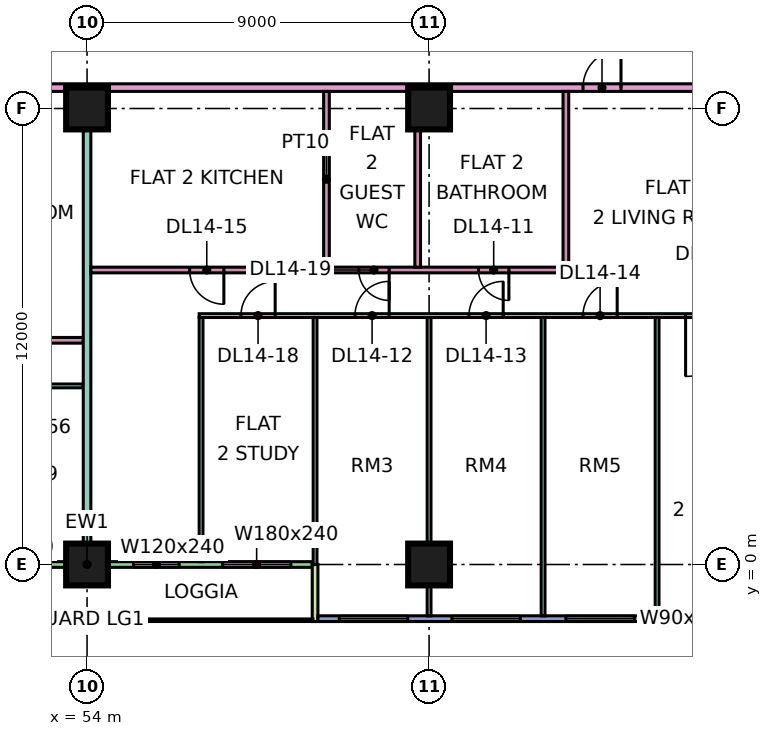
"""IFC4 building model, lengths in metres.
Left out: names, types, materials, properties, quantities, classifications, styles, units other than length and angle.
Written with IfcOpenShell. Run it as: python <this file> out.ifc"""

import sys

from ifc_helpers import new_model, si_unit, direction, frame, frame_2d, origin, origin_2d, place, context, subcontext, project, spatial, rectangle, extrude, element, fill, save


model = new_model("IFC4")
c1 = context("Model", 3, precision=1e-05, world=origin(), true_north=direction((0.0, 1.0)))
c2 = subcontext(c1, "Body", "Model", "MODEL_VIEW")
j1 = project(units=[si_unit("LENGTHUNIT", "METRE"), si_unit("PLANEANGLEUNIT", "RADIAN")], contexts=[c1])
p1 = place(None, origin())
s1 = spatial("IfcSite", under=j1, at=p1, CompositionType="ELEMENT")
p2 = place(p1, origin())
s2 = spatial("IfcBuilding", under=s1, at=p2, CompositionType="ELEMENT")
p3 = place(p2, frame((0.0, 0.0, 67.65)))
s3 = spatial("IfcBuildingStorey", under=s2, at=p3, CompositionType="ELEMENT", Elevation=67.65)
for number, where, z_axis, x_axis in (
    (1, (54.0, 0.0, 0.0), (0.0, 0.0, 1.0), (1.0, 0.0, 0.0)),
    (2, (54.0, 12.0, 0.0), (0.0, 0.0, 1.0), (1.0, 0.0, 0.0)),
    (3, (63.0, 0.0, 0.0), (0.0, 0.0, 1.0), (1.0, 0.0, 0.0)),
    (4, (63.0, 12.0, 0.0), (0.0, 0.0, 1.0), (1.0, 0.0, 0.0)),
):
    element("IfcColumn", number, at=place(p3, frame(where, z_axis=z_axis, x_axis=x_axis)), inside=s3, PredefinedType="COLUMN", context=c2, shape_type="SweptSolid", body=[
        extrude(rectangle(XDim=1.1, YDim=1.1, at=origin_2d()), origin(), (0.0, 0.0, 1.0), 3.75),
    ])
p4 = place(p3, frame((48.075, 0.0, 0.0), z_axis=(0.0, 0.0, 1.0), x_axis=(1.0, 0.0, 0.0)))
e5 = element("IfcWall", 5, at=p4, inside=s3, PredefinedType="SOLIDWALL", context=c2, shape_type="SweptSolid", body=[
    extrude(rectangle(XDim=11.85, YDim=0.15, at=frame_2d((5.925, 0.0))), origin(), (0.0, 0.0, 1.0), 3.35),
])
p5 = place(p4, frame((0.562, 0.0, 0.45)))
e6 = element("IfcOpeningElement", 6, at=p5, cuts=e5, PredefinedType="OPENING", context=c2, shape_type="SweptSolid", body=[
    extrude(rectangle(XDim=1.8, YDim=2.4, at=frame_2d((0.9, 1.2))), frame((0.0, 0.085, 0.0), z_axis=(0.0, -1.0, 0.0), x_axis=(1.0, 0.0, 0.0)), (0.0, 0.0, 1.0), 0.17),
])
p6 = place(p4, frame((3.5, 0.0, 0.45)))
e7 = element("IfcOpeningElement", 7, at=p6, cuts=e5, PredefinedType="OPENING", context=c2, shape_type="SweptSolid", body=[
    extrude(rectangle(XDim=1.2, YDim=2.4, at=frame_2d((0.6, 1.2))), frame((0.0, 0.085, 0.0), z_axis=(0.0, -1.0, 0.0), x_axis=(1.0, 0.0, 0.0)), (0.0, 0.0, 1.0), 0.17),
])
p7 = place(p4, frame((7.15, 0.0, 0.45)))
e8 = element("IfcOpeningElement", 8, at=p7, cuts=e5, PredefinedType="OPENING", context=c2, shape_type="SweptSolid", body=[
    extrude(rectangle(XDim=1.2, YDim=2.4, at=frame_2d((0.6, 1.2))), frame((0.0, 0.085, 0.0), z_axis=(0.0, -1.0, 0.0), x_axis=(1.0, 0.0, 0.0)), (0.0, 0.0, 1.0), 0.17),
])
p8 = place(p4, frame((9.488, 0.0, 0.45)))
e9 = element("IfcOpeningElement", 9, at=p8, cuts=e5, PredefinedType="OPENING", context=c2, shape_type="SweptSolid", body=[
    extrude(rectangle(XDim=1.8, YDim=2.4, at=frame_2d((0.9, 1.2))), frame((0.0, 0.085, 0.0), z_axis=(0.0, -1.0, 0.0), x_axis=(1.0, 0.0, 0.0)), (0.0, 0.0, 1.0), 0.17),
])
p9 = place(p3, frame((60.0, -1.5, 0.0), z_axis=(0.0, 0.0, 1.0), x_axis=(0.0, 1.0, 0.0)))
e10 = element("IfcWall", 10, at=p9, inside=s3, PredefinedType="SOLIDWALL", context=c2, shape_type="SweptSolid", body=[
    extrude(rectangle(XDim=1.5, YDim=0.15, at=frame_2d((0.75, 0.0))), origin(), (0.0, 0.0, 1.0), 3.35),
])
p10 = place(p3, frame((60.075, -1.425, 0.0), z_axis=(0.0, 0.0, 1.0), x_axis=(1.0, 0.0, 0.0)))
e11 = element("IfcWall", 11, at=p10, inside=s3, PredefinedType="SOLIDWALL", context=c2, shape_type="SweptSolid", body=[
    extrude(rectangle(XDim=10.425, YDim=0.15, at=frame_2d((5.212, 0.0))), origin(), (0.0, 0.0, 1.0), 3.35),
])
p11 = place(p10, frame((0.562, 0.0, 0.45)))
e12 = element("IfcOpeningElement", 12, at=p11, cuts=e11, PredefinedType="OPENING", context=c2, shape_type="SweptSolid", body=[
    extrude(rectangle(XDim=1.8, YDim=2.4, at=frame_2d((0.9, 1.2))), frame((0.0, 0.085, 0.0), z_axis=(0.0, -1.0, 0.0), x_axis=(1.0, 0.0, 0.0)), (0.0, 0.0, 1.0), 0.17),
])
p12 = place(p10, frame((3.525, 0.0, 0.45)))
e13 = element("IfcOpeningElement", 13, at=p12, cuts=e11, PredefinedType="OPENING", context=c2, shape_type="SweptSolid", body=[
    extrude(rectangle(XDim=1.8, YDim=2.4, at=frame_2d((0.9, 1.2))), frame((0.0, 0.085, 0.0), z_axis=(0.0, -1.0, 0.0), x_axis=(1.0, 0.0, 0.0)), (0.0, 0.0, 1.0), 0.17),
])
p13 = place(p10, frame((6.525, 0.0, 0.45)))
e14 = element("IfcOpeningElement", 14, at=p13, cuts=e11, PredefinedType="OPENING", context=c2, shape_type="SweptSolid", body=[
    extrude(rectangle(XDim=1.8, YDim=2.4, at=frame_2d((0.9, 1.2))), frame((0.0, 0.085, 0.0), z_axis=(0.0, -1.0, 0.0), x_axis=(1.0, 0.0, 0.0)), (0.0, 0.0, 1.0), 0.17),
])
p14 = place(p10, frame((9.225, 0.0, 0.45)))
e15 = element("IfcOpeningElement", 15, at=p14, cuts=e11, PredefinedType="OPENING", context=c2, shape_type="SweptSolid", body=[
    extrude(rectangle(XDim=0.9, YDim=2.4, at=frame_2d((0.45, 1.2))), frame((0.0, 0.085, 0.0), z_axis=(0.0, -1.0, 0.0), x_axis=(1.0, 0.0, 0.0)), (0.0, 0.0, 1.0), 0.17),
])
p15 = place(p3, frame((33.05, 4.7, 0.0), z_axis=(0.0, 0.0, 1.0), x_axis=(1.0, 0.0, 0.0)))
e16 = element("IfcWall", 16, at=p15, inside=s3, PredefinedType="PARTITIONING", context=c2, shape_type="SweptSolid", body=[
    extrude(rectangle(XDim=20.85, YDim=0.1, at=frame_2d((10.425, 0.0))), origin(), (0.0, 0.0, 1.0), 3.35),
])
p16 = place(p15, frame((10.0, 0.0, 0.0)))
e17 = element("IfcOpeningElement", 17, at=p16, cuts=e16, PredefinedType="OPENING", context=c2, shape_type="SweptSolid", body=[
    extrude(rectangle(XDim=0.9, YDim=2.1, at=frame_2d((0.45, 1.05))), frame((0.0, 0.06, 0.0), z_axis=(0.0, -1.0, 0.0), x_axis=(1.0, 0.0, 0.0)), (0.0, 0.0, 1.0), 0.12),
])
p17 = place(p15, frame((13.0, 0.0, 0.0)))
e18 = element("IfcOpeningElement", 18, at=p17, cuts=e16, PredefinedType="OPENING", context=c2, shape_type="SweptSolid", body=[
    extrude(rectangle(XDim=0.9, YDim=2.1, at=frame_2d((0.45, 1.05))), frame((0.0, 0.06, 0.0), z_axis=(0.0, -1.0, 0.0), x_axis=(1.0, 0.0, 0.0)), (0.0, 0.0, 1.0), 0.12),
])
p18 = place(p15, frame((16.0, 0.0, 0.0)))
e19 = element("IfcOpeningElement", 19, at=p18, cuts=e16, PredefinedType="OPENING", context=c2, shape_type="SweptSolid", body=[
    extrude(rectangle(XDim=0.9, YDim=2.1, at=frame_2d((0.45, 1.05))), frame((0.0, 0.06, 0.0), z_axis=(0.0, -1.0, 0.0), x_axis=(1.0, 0.0, 0.0)), (0.0, 0.0, 1.0), 0.12),
])
p19 = place(p15, frame((19.0, 0.0, 0.0)))
e20 = element("IfcOpeningElement", 20, at=p19, cuts=e16, PredefinedType="OPENING", context=c2, shape_type="SweptSolid", body=[
    extrude(rectangle(XDim=0.9, YDim=2.1, at=frame_2d((0.45, 1.05))), frame((0.0, 0.06, 0.0), z_axis=(0.0, -1.0, 0.0), x_axis=(1.0, 0.0, 0.0)), (0.0, 0.0, 1.0), 0.12),
])
p20 = place(p15, frame((4.0, 0.0, 0.0)))
e21 = element("IfcOpeningElement", 21, at=p20, cuts=e16, PredefinedType="OPENING", context=c2, shape_type="SweptSolid", body=[
    extrude(rectangle(XDim=0.9, YDim=2.1, at=frame_2d((0.45, 1.05))), frame((0.0, 0.06, 0.0), z_axis=(0.0, -1.0, 0.0), x_axis=(1.0, 0.0, 0.0)), (0.0, 0.0, 1.0), 0.12),
])
p21 = place(p3, frame((40.65, 12.55, 0.0), z_axis=(0.0, 0.0, 1.0), x_axis=(1.0, 0.0, 0.0)))
e22 = element("IfcWall", 22, at=p21, inside=s3, PredefinedType="PARTITIONING", context=c2, shape_type="SweptSolid", body=[
    extrude(rectangle(XDim=31.35, YDim=0.2, at=frame_2d((15.675, 0.0))), origin(), (0.0, 0.0, 1.0), 3.35),
])
p22 = place(p21, frame((26.4, 0.0, 0.0)))
e23 = element("IfcOpeningElement", 23, at=p22, cuts=e22, PredefinedType="OPENING", context=c2, shape_type="SweptSolid", body=[
    extrude(rectangle(XDim=1.0, YDim=2.1, at=frame_2d((0.5, 1.05))), frame((0.0, 0.11, 0.0), z_axis=(0.0, -1.0, 0.0), x_axis=(1.0, 0.0, 0.0)), (0.0, 0.0, 1.0), 0.22),
])
p23 = place(p21, frame((1.05, 0.0, 0.0)))
e24 = element("IfcOpeningElement", 24, at=p23, cuts=e22, PredefinedType="OPENING", context=c2, shape_type="SweptSolid", body=[
    extrude(rectangle(XDim=1.0, YDim=2.1, at=frame_2d((0.5, 1.05))), frame((0.0, 0.11, 0.0), z_axis=(0.0, -1.0, 0.0), x_axis=(1.0, 0.0, 0.0)), (0.0, 0.0, 1.0), 0.22),
])
p24 = place(p3, frame((43.575, 5.9, 0.0), z_axis=(0.0, 0.0, 1.0), x_axis=(1.0, 0.0, 0.0)))
e25 = element("IfcWall", 25, at=p24, inside=s3, PredefinedType="PARTITIONING", context=c2, shape_type="SweptSolid", body=[
    extrude(rectangle(XDim=10.325, YDim=0.15, at=frame_2d((5.163, 0.0))), origin(), (0.0, 0.0, 1.0), 3.35),
])
p25 = place(p24, frame((1.825, 0.0, 0.0)))
e26 = element("IfcOpeningElement", 26, at=p25, cuts=e25, PredefinedType="OPENING", context=c2, shape_type="SweptSolid", body=[
    extrude(rectangle(XDim=0.8, YDim=2.1, at=frame_2d((0.4, 1.05))), frame((0.0, 0.085, 0.0), z_axis=(0.0, -1.0, 0.0), x_axis=(1.0, 0.0, 0.0)), (0.0, 0.0, 1.0), 0.17),
])
p26 = place(p24, frame((6.975, 0.0, 0.0)))
e27 = element("IfcOpeningElement", 27, at=p26, cuts=e25, PredefinedType="OPENING", context=c2, shape_type="SweptSolid", body=[
    extrude(rectangle(XDim=0.9, YDim=2.1, at=frame_2d((0.45, 1.05))), frame((0.0, 0.085, 0.0), z_axis=(0.0, -1.0, 0.0), x_axis=(1.0, 0.0, 0.0)), (0.0, 0.0, 1.0), 0.17),
])
p27 = place(p3, frame((54.0, 0.074, 0.0), z_axis=(0.0, 0.0, 1.0), x_axis=(0.0, 1.0, 0.0)))
e28 = element("IfcWall", 28, at=p27, inside=s3, PredefinedType="PARTITIONING", context=c2, shape_type="SweptSolid", body=[
    extrude(rectangle(XDim=12.376, YDim=0.2, at=frame_2d((6.188, 0.0))), origin(), (0.0, 0.0, 1.0), 3.35),
])
p28 = place(p3, frame((54.1, 7.75, 0.0), z_axis=(0.0, 0.0, 1.0), x_axis=(1.0, 0.0, 0.0)))
e29 = element("IfcWall", 29, at=p28, inside=s3, PredefinedType="PARTITIONING", context=c2, shape_type="SweptSolid", body=[
    extrude(rectangle(XDim=12.575, YDim=0.15, at=frame_2d((6.288, 0.0))), origin(), (0.0, 0.0, 1.0), 3.35),
])
p29 = place(p28, frame((10.2, 0.0, 0.0)))
e30 = element("IfcOpeningElement", 30, at=p29, cuts=e29, PredefinedType="OPENING", context=c2, shape_type="SweptSolid", body=[
    extrude(rectangle(XDim=0.8, YDim=2.1, at=frame_2d((0.4, 1.05))), frame((0.0, 0.085, 0.0), z_axis=(0.0, -1.0, 0.0), x_axis=(1.0, 0.0, 0.0)), (0.0, 0.0, 1.0), 0.17),
])
p30 = place(p28, frame((2.6, 0.0, 0.0)))
e31 = element("IfcOpeningElement", 31, at=p30, cuts=e29, PredefinedType="OPENING", context=c2, shape_type="SweptSolid", body=[
    extrude(rectangle(XDim=0.9, YDim=2.1, at=frame_2d((0.45, 1.05))), frame((0.0, 0.085, 0.0), z_axis=(0.0, -1.0, 0.0), x_axis=(1.0, 0.0, 0.0)), (0.0, 0.0, 1.0), 0.17),
])
p31 = place(p28, frame((7.05, 0.0, 0.0)))
e32 = element("IfcOpeningElement", 32, at=p31, cuts=e29, PredefinedType="OPENING", context=c2, shape_type="SweptSolid", body=[
    extrude(rectangle(XDim=0.8, YDim=2.1, at=frame_2d((0.4, 1.05))), frame((0.0, 0.085, 0.0), z_axis=(0.0, -1.0, 0.0), x_axis=(1.0, 0.0, 0.0)), (0.0, 0.0, 1.0), 0.17),
])
p32 = place(p3, frame((56.95, 6.55, 0.0), z_axis=(0.0, 0.0, 1.0), x_axis=(1.0, 0.0, 0.0)))
e33 = element("IfcWall", 33, at=p32, inside=s3, PredefinedType="PARTITIONING", context=c2, shape_type="SweptSolid", body=[
    extrude(rectangle(XDim=14.976, YDim=0.1, at=frame_2d((7.488, 0.0))), origin(), (0.0, 0.0, 1.0), 3.35),
])
p33 = place(p32, frame((4.1, 0.0, 0.0)))
e34 = element("IfcOpeningElement", 34, at=p33, cuts=e33, PredefinedType="OPENING", context=c2, shape_type="SweptSolid", body=[
    extrude(rectangle(XDim=0.9, YDim=2.1, at=frame_2d((0.45, 1.05))), frame((0.0, 0.06, 0.0), z_axis=(0.0, -1.0, 0.0), x_axis=(1.0, 0.0, 0.0)), (0.0, 0.0, 1.0), 0.12),
])
p34 = place(p32, frame((7.1, 0.0, 0.0)))
e35 = element("IfcOpeningElement", 35, at=p34, cuts=e33, PredefinedType="OPENING", context=c2, shape_type="SweptSolid", body=[
    extrude(rectangle(XDim=0.9, YDim=2.1, at=frame_2d((0.45, 1.05))), frame((0.0, 0.06, 0.0), z_axis=(0.0, -1.0, 0.0), x_axis=(1.0, 0.0, 0.0)), (0.0, 0.0, 1.0), 0.12),
])
p35 = place(p32, frame((10.1, 0.0, 0.0)))
e36 = element("IfcOpeningElement", 36, at=p35, cuts=e33, PredefinedType="OPENING", context=c2, shape_type="SweptSolid", body=[
    extrude(rectangle(XDim=0.9, YDim=2.1, at=frame_2d((0.45, 1.05))), frame((0.0, 0.06, 0.0), z_axis=(0.0, -1.0, 0.0), x_axis=(1.0, 0.0, 0.0)), (0.0, 0.0, 1.0), 0.12),
])
p36 = place(p32, frame((12.8, 0.0, 0.0)))
e37 = element("IfcOpeningElement", 37, at=p36, cuts=e33, PredefinedType="OPENING", context=c2, shape_type="SweptSolid", body=[
    extrude(rectangle(XDim=1.6, YDim=2.1, at=frame_2d((0.8, 1.05))), frame((0.0, 0.06, 0.0), z_axis=(0.0, -1.0, 0.0), x_axis=(1.0, 0.0, 0.0)), (0.0, 0.0, 1.0), 0.12),
])
p37 = place(p32, frame((1.1, 0.0, 0.0)))
e38 = element("IfcOpeningElement", 38, at=p37, cuts=e33, PredefinedType="OPENING", context=c2, shape_type="SweptSolid", body=[
    extrude(rectangle(XDim=0.9, YDim=2.1, at=frame_2d((0.45, 1.05))), frame((0.0, 0.06, 0.0), z_axis=(0.0, -1.0, 0.0), x_axis=(1.0, 0.0, 0.0)), (0.0, 0.0, 1.0), 0.12),
])
p38 = place(p3, frame((57.0, 0.074, 0.0), z_axis=(0.0, 0.0, 1.0), x_axis=(0.0, 1.0, 0.0)))
e39 = element("IfcWall", 39, at=p38, inside=s3, PredefinedType="PARTITIONING", context=c2, shape_type="SweptSolid", body=[
    extrude(rectangle(XDim=6.426, YDim=0.1, at=frame_2d((3.213, 0.0))), origin(), (0.0, 0.0, 1.0), 3.35),
])
p39 = place(p3, frame((60.0, 0.0, 0.0), z_axis=(0.0, 0.0, 1.0), x_axis=(0.0, 1.0, 0.0)))
e40 = element("IfcWall", 40, at=p39, inside=s3, PredefinedType="PARTITIONING", context=c2, shape_type="SweptSolid", body=[
    extrude(rectangle(XDim=6.5, YDim=0.1, at=frame_2d((3.25, 0.0))), origin(), (0.0, 0.0, 1.0), 3.35),
])
for number, where, z_axis, x_axis in (
    (41, (60.3, 7.825, 0.0), (0.0, 0.0, 1.0), (0.0, 1.0, 0.0)),
    (42, (62.7, 7.825, 0.0), (0.0, 0.0, 1.0), (0.0, 1.0, 0.0)),
):
    element("IfcWall", number, at=place(p3, frame(where, z_axis=z_axis, x_axis=x_axis)), inside=s3, PredefinedType="PARTITIONING", context=c2, shape_type="SweptSolid", body=[
        extrude(rectangle(XDim=4.625, YDim=0.15, at=frame_2d((2.312, 0.0))), origin(), (0.0, 0.0, 1.0), 3.35),
    ])
for number, where, z_axis, x_axis in (
    (43, (63.0, -1.351, 0.0), (0.0, 0.0, 1.0), (0.0, 1.0, 0.0)),
    (44, (66.0, -1.351, 0.0), (0.0, 0.0, 1.0), (0.0, 1.0, 0.0)),
):
    element("IfcWall", number, at=place(p3, frame(where, z_axis=z_axis, x_axis=x_axis)), inside=s3, PredefinedType="PARTITIONING", context=c2, shape_type="SweptSolid", body=[
        extrude(rectangle(XDim=7.851, YDim=0.1, at=frame_2d((3.926, 0.0))), origin(), (0.0, 0.0, 1.0), 3.35),
    ])
p40 = place(p3, frame((66.6, 7.825, 0.0), z_axis=(0.0, 0.0, 1.0), x_axis=(0.0, 1.0, 0.0)))
e45 = element("IfcWall", 45, at=p40, inside=s3, PredefinedType="PARTITIONING", context=c2, shape_type="SweptSolid", body=[
    extrude(rectangle(XDim=4.625, YDim=0.15, at=frame_2d((2.312, 0.0))), origin(), (0.0, 0.0, 1.0), 3.35),
])
p41 = place(p3, frame((69.0, -1.351, 0.0), z_axis=(0.0, 0.0, 1.0), x_axis=(0.0, 1.0, 0.0)))
e46 = element("IfcWall", 46, at=p41, inside=s3, PredefinedType="PARTITIONING", context=c2, shape_type="SweptSolid", body=[
    extrude(rectangle(XDim=7.851, YDim=0.1, at=frame_2d((3.926, 0.0))), origin(), (0.0, 0.0, 1.0), 3.35),
])
p42 = place(p7, origin())
e47 = element("IfcWindow", 47, at=p42, inside=s3, PartitioningType="SINGLE_PANEL", PredefinedType="WINDOW", context=c2, shape_type="SweptSolid", body=[
    extrude(rectangle(XDim=1.2, YDim=2.4, at=frame_2d((0.6, 1.2))), frame((0.0, 0.03, 0.0), z_axis=(0.0, -1.0, 0.0), x_axis=(1.0, 0.0, 0.0)), (0.0, 0.0, 1.0), 0.06),
])
fill(e8, e47)
p43 = place(p8, origin())
e48 = element("IfcWindow", 48, at=p43, inside=s3, PartitioningType="SINGLE_PANEL", PredefinedType="WINDOW", context=c2, shape_type="SweptSolid", body=[
    extrude(rectangle(XDim=1.8, YDim=2.4, at=frame_2d((0.9, 1.2))), frame((0.0, 0.03, 0.0), z_axis=(0.0, -1.0, 0.0), x_axis=(1.0, 0.0, 0.0)), (0.0, 0.0, 1.0), 0.06),
])
fill(e9, e48)
p44 = place(p11, origin())
e49 = element("IfcWindow", 49, at=p44, inside=s3, PartitioningType="SINGLE_PANEL", PredefinedType="WINDOW", context=c2, shape_type="SweptSolid", body=[
    extrude(rectangle(XDim=1.8, YDim=2.4, at=frame_2d((0.9, 1.2))), frame((0.0, 0.03, 0.0), z_axis=(0.0, -1.0, 0.0), x_axis=(1.0, 0.0, 0.0)), (0.0, 0.0, 1.0), 0.06),
])
fill(e12, e49)
p45 = place(p12, origin())
e50 = element("IfcWindow", 50, at=p45, inside=s3, PartitioningType="SINGLE_PANEL", PredefinedType="WINDOW", context=c2, shape_type="SweptSolid", body=[
    extrude(rectangle(XDim=1.8, YDim=2.4, at=frame_2d((0.9, 1.2))), frame((0.0, 0.03, 0.0), z_axis=(0.0, -1.0, 0.0), x_axis=(1.0, 0.0, 0.0)), (0.0, 0.0, 1.0), 0.06),
])
fill(e13, e50)
p46 = place(p13, origin())
e51 = element("IfcWindow", 51, at=p46, inside=s3, PartitioningType="SINGLE_PANEL", PredefinedType="WINDOW", context=c2, shape_type="SweptSolid", body=[
    extrude(rectangle(XDim=1.8, YDim=2.4, at=frame_2d((0.9, 1.2))), frame((0.0, 0.03, 0.0), z_axis=(0.0, -1.0, 0.0), x_axis=(1.0, 0.0, 0.0)), (0.0, 0.0, 1.0), 0.06),
])
fill(e14, e51)
p47 = place(p14, origin())
e52 = element("IfcWindow", 52, at=p47, inside=s3, PartitioningType="SINGLE_PANEL", PredefinedType="WINDOW", context=c2, shape_type="SweptSolid", body=[
    extrude(rectangle(XDim=0.9, YDim=2.4, at=frame_2d((0.45, 1.2))), frame((0.0, 0.03, 0.0), z_axis=(0.0, -1.0, 0.0), x_axis=(1.0, 0.0, 0.0)), (0.0, 0.0, 1.0), 0.06),
])
fill(e15, e52)
p48 = place(p29, origin())
e53 = element("IfcDoor", 53, at=p48, inside=s3, OperationType="SINGLE_SWING_RIGHT", PredefinedType="DOOR", context=c2, shape_type="SweptSolid", body=[
    extrude(rectangle(XDim=0.8, YDim=2.1, at=frame_2d((0.4, 1.05))), frame((0.0, 0.025, 0.0), z_axis=(0.0, -1.0, 0.0), x_axis=(1.0, 0.0, 0.0)), (0.0, 0.0, 1.0), 0.05),
])
fill(e30, e53)
p49 = place(p33, frame((0.9, 0.0, 0.0), z_axis=(0.0, 0.0, 1.0), x_axis=(-1.0, 0.0, 0.0)))
e54 = element("IfcDoor", 54, at=p49, inside=s3, OperationType="SINGLE_SWING_RIGHT", PredefinedType="DOOR", context=c2, shape_type="SweptSolid", body=[
    extrude(rectangle(XDim=0.9, YDim=2.1, at=frame_2d((0.45, 1.05))), frame((0.0, 0.025, 0.0), z_axis=(0.0, -1.0, 0.0), x_axis=(1.0, 0.0, 0.0)), (0.0, 0.0, 1.0), 0.05),
])
fill(e34, e54)
p50 = place(p34, frame((0.9, 0.0, 0.0), z_axis=(0.0, 0.0, 1.0), x_axis=(-1.0, 0.0, 0.0)))
e55 = element("IfcDoor", 55, at=p50, inside=s3, OperationType="SINGLE_SWING_RIGHT", PredefinedType="DOOR", context=c2, shape_type="SweptSolid", body=[
    extrude(rectangle(XDim=0.9, YDim=2.1, at=frame_2d((0.45, 1.05))), frame((0.0, 0.025, 0.0), z_axis=(0.0, -1.0, 0.0), x_axis=(1.0, 0.0, 0.0)), (0.0, 0.0, 1.0), 0.05),
])
fill(e35, e55)
p51 = place(p35, frame((0.9, 0.0, 0.0), z_axis=(0.0, 0.0, 1.0), x_axis=(-1.0, 0.0, 0.0)))
e56 = element("IfcDoor", 56, at=p51, inside=s3, OperationType="SINGLE_SWING_RIGHT", PredefinedType="DOOR", context=c2, shape_type="SweptSolid", body=[
    extrude(rectangle(XDim=0.9, YDim=2.1, at=frame_2d((0.45, 1.05))), frame((0.0, 0.025, 0.0), z_axis=(0.0, -1.0, 0.0), x_axis=(1.0, 0.0, 0.0)), (0.0, 0.0, 1.0), 0.05),
])
fill(e36, e56)
p52 = place(p30, origin())
e57 = element("IfcDoor", 57, at=p52, inside=s3, OperationType="SINGLE_SWING_RIGHT", PredefinedType="DOOR", context=c2, shape_type="SweptSolid", body=[
    extrude(rectangle(XDim=0.9, YDim=2.1, at=frame_2d((0.45, 1.05))), frame((0.0, 0.025, 0.0), z_axis=(0.0, -1.0, 0.0), x_axis=(1.0, 0.0, 0.0)), (0.0, 0.0, 1.0), 0.05),
])
fill(e31, e57)
p53 = place(p22, frame((1.0, 0.0, 0.0), z_axis=(0.0, 0.0, 1.0), x_axis=(-1.0, 0.0, 0.0)))
e58 = element("IfcDoor", 58, at=p53, inside=s3, OperationType="SINGLE_SWING_RIGHT", PredefinedType="DOOR", context=c2, shape_type="SweptSolid", body=[
    extrude(rectangle(XDim=1.0, YDim=2.1, at=frame_2d((0.5, 1.05))), frame((0.0, 0.025, 0.0), z_axis=(0.0, -1.0, 0.0), x_axis=(1.0, 0.0, 0.0)), (0.0, 0.0, 1.0), 0.05),
])
fill(e23, e58)
p54 = place(p36, frame((1.6, 0.0, 0.0), z_axis=(0.0, 0.0, 1.0), x_axis=(-1.0, 0.0, 0.0)))
e59 = element("IfcDoor", 59, at=p54, inside=s3, OperationType="DOUBLE_DOOR_SINGLE_SWING", PredefinedType="DOOR", context=c2, shape_type="SweptSolid", body=[
    extrude(rectangle(XDim=1.6, YDim=2.1, at=frame_2d((0.8, 1.05))), frame((0.0, 0.025, 0.0), z_axis=(0.0, -1.0, 0.0), x_axis=(1.0, 0.0, 0.0)), (0.0, 0.0, 1.0), 0.05),
])
fill(e37, e59)
p55 = place(p37, frame((0.9, 0.0, 0.0), z_axis=(0.0, 0.0, 1.0), x_axis=(-1.0, 0.0, 0.0)))
e60 = element("IfcDoor", 60, at=p55, inside=s3, OperationType="SINGLE_SWING_RIGHT", PredefinedType="DOOR", context=c2, shape_type="SweptSolid", body=[
    extrude(rectangle(XDim=0.9, YDim=2.1, at=frame_2d((0.45, 1.05))), frame((0.0, 0.025, 0.0), z_axis=(0.0, -1.0, 0.0), x_axis=(1.0, 0.0, 0.0)), (0.0, 0.0, 1.0), 0.05),
])
fill(e38, e60)
p56 = place(p31, origin())
e61 = element("IfcDoor", 61, at=p56, inside=s3, OperationType="SINGLE_SWING_RIGHT", PredefinedType="DOOR", context=c2, shape_type="SweptSolid", body=[
    extrude(rectangle(XDim=0.8, YDim=2.1, at=frame_2d((0.4, 1.05))), frame((0.0, 0.025, 0.0), z_axis=(0.0, -1.0, 0.0), x_axis=(1.0, 0.0, 0.0)), (0.0, 0.0, 1.0), 0.05),
])
fill(e32, e61)
save(model, sys.argv[1])
